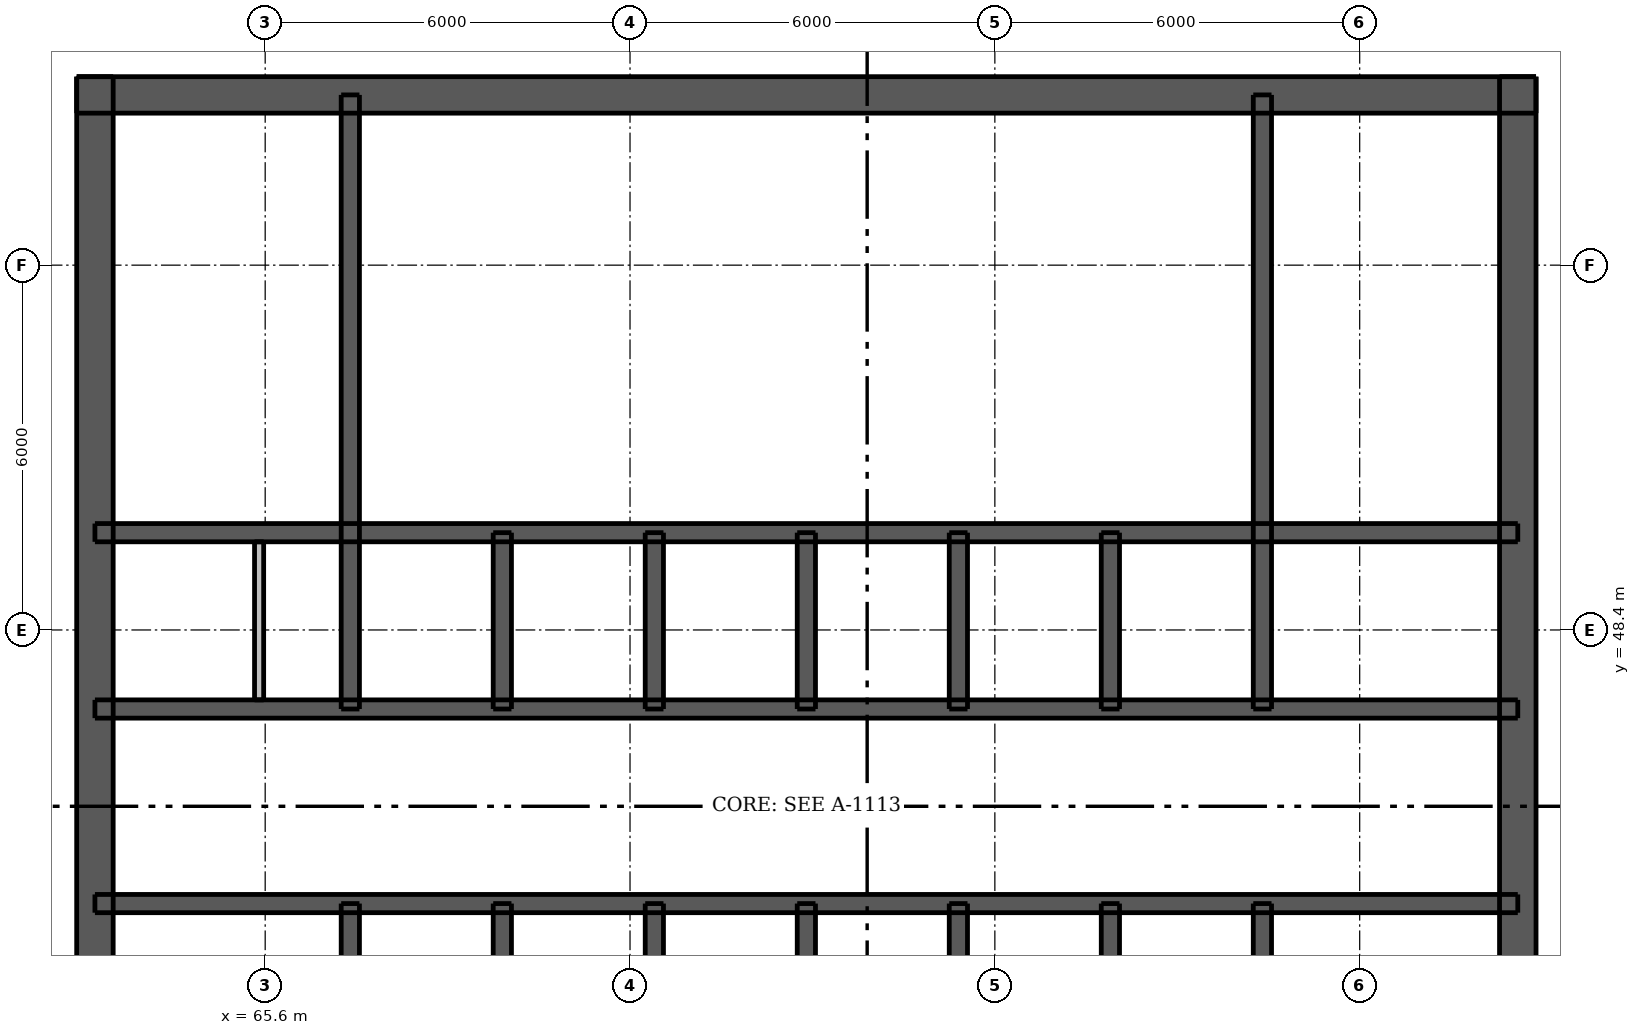
"""IFC4 building model, lengths in metres.
Left out: names, types, materials, properties, quantities, classifications, styles, units other than length and angle.
Written with IfcOpenShell. Run it as: python <this file> out.ifc"""

import sys

from ifc_helpers import new_model, si_unit, direction, frame, frame_2d, origin, place, context, subcontext, project, spatial, rectangle, extrude, element, fill, save


model = new_model("IFC4")
c1 = context("Model", 3, precision=1e-05, world=origin(), true_north=direction((0.0, 1.0)))
c2 = subcontext(c1, "Body", "Model", "MODEL_VIEW")
j1 = project(units=[si_unit("LENGTHUNIT", "METRE"), si_unit("PLANEANGLEUNIT", "RADIAN")], contexts=[c1])
p1 = place(None, origin())
s1 = spatial("IfcSite", under=j1, at=p1, CompositionType="ELEMENT")
p2 = place(p1, origin())
s2 = spatial("IfcBuilding", under=s1, at=p2, CompositionType="ELEMENT")
p3 = place(p2, frame((0.0, 0.0, 226.6)))
s3 = spatial("IfcBuildingStorey", under=s2, at=p3, CompositionType="ELEMENT", Elevation=226.6)
p4 = place(p3, frame((62.5, 57.2, 0.0), z_axis=(0.0, 0.0, 1.0), x_axis=(1.0, 0.0, 0.0)))
e1 = element("IfcWall", 1, at=p4, inside=s3, PredefinedType="SHEAR", context=c2, shape_type="SweptSolid", body=[
    extrude(rectangle(XDim=24.0, YDim=0.6, at=frame_2d((12.0, 0.0))), origin(), (0.0, 0.0, 1.0), 2.95),
])
p5 = place(p4, frame((20.975, 0.0, 0.0)))
e2 = element("IfcOpeningElement", 2, at=p5, cuts=e1, PredefinedType="OPENING", context=c2, shape_type="SweptSolid", body=[
    extrude(rectangle(XDim=1.1, YDim=2.1, at=frame_2d((0.55, 1.05))), frame((0.0, 0.31, 0.0), z_axis=(0.0, -1.0, 0.0), x_axis=(1.0, 0.0, 0.0)), (0.0, 0.0, 1.0), 0.62),
])
p6 = place(p4, frame((1.925, 0.0, 0.0)))
e3 = element("IfcOpeningElement", 3, at=p6, cuts=e1, PredefinedType="OPENING", context=c2, shape_type="SweptSolid", body=[
    extrude(rectangle(XDim=1.1, YDim=2.1, at=frame_2d((0.55, 1.05))), frame((0.0, 0.31, 0.0), z_axis=(0.0, -1.0, 0.0), x_axis=(1.0, 0.0, 0.0)), (0.0, 0.0, 1.0), 0.62),
])
p7 = place(p4, frame((11.55, 0.0, 0.0)))
e4 = element("IfcOpeningElement", 4, at=p7, cuts=e1, PredefinedType="OPENING", context=c2, shape_type="SweptSolid", body=[
    extrude(rectangle(XDim=0.9, YDim=2.1, at=frame_2d((0.45, 1.05))), frame((0.0, 0.31, 0.0), z_axis=(0.0, -1.0, 0.0), x_axis=(1.0, 0.0, 0.0)), (0.0, 0.0, 1.0), 0.62),
])
p8 = place(p3, frame((62.8, 33.5, 0.0), z_axis=(0.0, 0.0, 1.0), x_axis=(0.0, 1.0, 0.0)))
e5 = element("IfcWall", 5, at=p8, inside=s3, PredefinedType="SHEAR", context=c2, shape_type="SweptSolid", body=[
    extrude(rectangle(XDim=24.0, YDim=0.6, at=frame_2d((12.0, 0.0))), origin(), (0.0, 0.0, 1.0), 2.95),
])
p9 = place(p8, frame((11.2, 0.0, 0.0)))
e6 = element("IfcOpeningElement", 6, at=p9, cuts=e5, PredefinedType="OPENING", context=c2, shape_type="SweptSolid", body=[
    extrude(rectangle(XDim=1.6, YDim=2.1, at=frame_2d((0.8, 1.05))), frame((0.0, 0.31, 0.0), z_axis=(0.0, -1.0, 0.0), x_axis=(1.0, 0.0, 0.0)), (0.0, 0.0, 1.0), 0.62),
])
p10 = place(p3, frame((86.2, 33.5, 0.0), z_axis=(0.0, 0.0, 1.0), x_axis=(0.0, 1.0, 0.0)))
e7 = element("IfcWall", 7, at=p10, inside=s3, PredefinedType="SHEAR", context=c2, shape_type="SweptSolid", body=[
    extrude(rectangle(XDim=24.0, YDim=0.6, at=frame_2d((12.0, 0.0))), origin(), (0.0, 0.0, 1.0), 2.95),
])
p11 = place(p10, frame((11.2, 0.0, 0.0)))
e8 = element("IfcOpeningElement", 8, at=p11, cuts=e7, PredefinedType="OPENING", context=c2, shape_type="SweptSolid", body=[
    extrude(rectangle(XDim=1.6, YDim=2.1, at=frame_2d((0.8, 1.05))), frame((0.0, 0.31, 0.0), z_axis=(0.0, -1.0, 0.0), x_axis=(1.0, 0.0, 0.0)), (0.0, 0.0, 1.0), 0.62),
])
p12 = place(p3, frame((62.8, 43.9, 0.0), z_axis=(0.0, 0.0, 1.0), x_axis=(1.0, 0.0, 0.0)))
e9 = element("IfcWall", 9, at=p12, inside=s3, PredefinedType="SHEAR", context=c2, shape_type="SweptSolid", body=[
    extrude(rectangle(XDim=23.4, YDim=0.3, at=frame_2d((11.7, 0.0))), origin(), (0.0, 0.0, 1.0), 2.95),
])
p13 = place(p12, frame((1.725, 0.0, 0.0)))
e10 = element("IfcOpeningElement", 10, at=p13, cuts=e9, PredefinedType="OPENING", context=c2, shape_type="SweptSolid", body=[
    extrude(rectangle(XDim=0.9, YDim=2.1, at=frame_2d((0.45, 1.05))), frame((0.0, 0.16, 0.0), z_axis=(0.0, -1.0, 0.0), x_axis=(1.0, 0.0, 0.0)), (0.0, 0.0, 1.0), 0.32),
])
p14 = place(p12, frame((20.775, 0.0, 0.0)))
e11 = element("IfcOpeningElement", 11, at=p14, cuts=e9, PredefinedType="OPENING", context=c2, shape_type="SweptSolid", body=[
    extrude(rectangle(XDim=0.9, YDim=2.1, at=frame_2d((0.45, 1.05))), frame((0.0, 0.16, 0.0), z_axis=(0.0, -1.0, 0.0), x_axis=(1.0, 0.0, 0.0)), (0.0, 0.0, 1.0), 0.32),
])
p15 = place(p12, frame((5.0, 0.0, 0.0)))
e12 = element("IfcOpeningElement", 12, at=p15, cuts=e9, PredefinedType="OPENING", context=c2, shape_type="SweptSolid", body=[
    extrude(rectangle(XDim=0.9, YDim=2.1, at=frame_2d((0.45, 1.05))), frame((0.0, 0.16, 0.0), z_axis=(0.0, -1.0, 0.0), x_axis=(1.0, 0.0, 0.0)), (0.0, 0.0, 1.0), 0.32),
])
p16 = place(p12, frame((7.5, 0.0, 0.0)))
e13 = element("IfcOpeningElement", 13, at=p16, cuts=e9, PredefinedType="OPENING", context=c2, shape_type="SweptSolid", body=[
    extrude(rectangle(XDim=0.9, YDim=2.1, at=frame_2d((0.45, 1.05))), frame((0.0, 0.16, 0.0), z_axis=(0.0, -1.0, 0.0), x_axis=(1.0, 0.0, 0.0)), (0.0, 0.0, 1.0), 0.32),
])
p17 = place(p12, frame((12.5, 0.0, 0.0)))
e14 = element("IfcOpeningElement", 14, at=p17, cuts=e9, PredefinedType="OPENING", context=c2, shape_type="SweptSolid", body=[
    extrude(rectangle(XDim=0.9, YDim=2.1, at=frame_2d((0.45, 1.05))), frame((0.0, 0.16, 0.0), z_axis=(0.0, -1.0, 0.0), x_axis=(1.0, 0.0, 0.0)), (0.0, 0.0, 1.0), 0.32),
])
p18 = place(p12, frame((15.0, 0.0, 0.0)))
e15 = element("IfcOpeningElement", 15, at=p18, cuts=e9, PredefinedType="OPENING", context=c2, shape_type="SweptSolid", body=[
    extrude(rectangle(XDim=0.9, YDim=2.1, at=frame_2d((0.45, 1.05))), frame((0.0, 0.16, 0.0), z_axis=(0.0, -1.0, 0.0), x_axis=(1.0, 0.0, 0.0)), (0.0, 0.0, 1.0), 0.32),
])
p19 = place(p3, frame((62.8, 47.1, 0.0), z_axis=(0.0, 0.0, 1.0), x_axis=(1.0, 0.0, 0.0)))
e16 = element("IfcWall", 16, at=p19, inside=s3, PredefinedType="SHEAR", context=c2, shape_type="SweptSolid", body=[
    extrude(rectangle(XDim=23.4, YDim=0.3, at=frame_2d((11.7, 0.0))), origin(), (0.0, 0.0, 1.0), 2.95),
])
p20 = place(p19, frame((1.05, 0.0, 0.0)))
e17 = element("IfcOpeningElement", 17, at=p20, cuts=e16, PredefinedType="OPENING", context=c2, shape_type="SweptSolid", body=[
    extrude(rectangle(XDim=0.9, YDim=2.1, at=frame_2d((0.45, 1.05))), frame((0.0, 0.16, 0.0), z_axis=(0.0, -1.0, 0.0), x_axis=(1.0, 0.0, 0.0)), (0.0, 0.0, 1.0), 0.32),
])
p21 = place(p19, frame((2.975, 0.0, 0.0)))
e18 = element("IfcOpeningElement", 18, at=p21, cuts=e16, PredefinedType="OPENING", context=c2, shape_type="SweptSolid", body=[
    extrude(rectangle(XDim=0.8, YDim=2.1, at=frame_2d((0.4, 1.05))), frame((0.0, 0.16, 0.0), z_axis=(0.0, -1.0, 0.0), x_axis=(1.0, 0.0, 0.0)), (0.0, 0.0, 1.0), 0.32),
])
p22 = place(p19, frame((20.775, 0.0, 0.0)))
e19 = element("IfcOpeningElement", 19, at=p22, cuts=e16, PredefinedType="OPENING", context=c2, shape_type="SweptSolid", body=[
    extrude(rectangle(XDim=0.9, YDim=2.1, at=frame_2d((0.45, 1.05))), frame((0.0, 0.16, 0.0), z_axis=(0.0, -1.0, 0.0), x_axis=(1.0, 0.0, 0.0)), (0.0, 0.0, 1.0), 0.32),
])
p23 = place(p19, frame((4.9, 0.0, 0.0)))
e20 = element("IfcOpeningElement", 20, at=p23, cuts=e16, PredefinedType="OPENING", context=c2, shape_type="SweptSolid", body=[
    extrude(rectangle(XDim=1.1, YDim=2.1, at=frame_2d((0.55, 1.05))), frame((0.0, 0.16, 0.0), z_axis=(0.0, -1.0, 0.0), x_axis=(1.0, 0.0, 0.0)), (0.0, 0.0, 1.0), 0.32),
])
p24 = place(p19, frame((7.4, 0.0, 0.0)))
e21 = element("IfcOpeningElement", 21, at=p24, cuts=e16, PredefinedType="OPENING", context=c2, shape_type="SweptSolid", body=[
    extrude(rectangle(XDim=1.1, YDim=2.1, at=frame_2d((0.55, 1.05))), frame((0.0, 0.16, 0.0), z_axis=(0.0, -1.0, 0.0), x_axis=(1.0, 0.0, 0.0)), (0.0, 0.0, 1.0), 0.32),
])
p25 = place(p19, frame((9.9, 0.0, 0.0)))
e22 = element("IfcOpeningElement", 22, at=p25, cuts=e16, PredefinedType="OPENING", context=c2, shape_type="SweptSolid", body=[
    extrude(rectangle(XDim=1.1, YDim=2.1, at=frame_2d((0.55, 1.05))), frame((0.0, 0.16, 0.0), z_axis=(0.0, -1.0, 0.0), x_axis=(1.0, 0.0, 0.0)), (0.0, 0.0, 1.0), 0.32),
])
p26 = place(p19, frame((12.4, 0.0, 0.0)))
e23 = element("IfcOpeningElement", 23, at=p26, cuts=e16, PredefinedType="OPENING", context=c2, shape_type="SweptSolid", body=[
    extrude(rectangle(XDim=1.1, YDim=2.1, at=frame_2d((0.55, 1.05))), frame((0.0, 0.16, 0.0), z_axis=(0.0, -1.0, 0.0), x_axis=(1.0, 0.0, 0.0)), (0.0, 0.0, 1.0), 0.32),
])
p27 = place(p19, frame((14.9, 0.0, 0.0)))
e24 = element("IfcOpeningElement", 24, at=p27, cuts=e16, PredefinedType="OPENING", context=c2, shape_type="SweptSolid", body=[
    extrude(rectangle(XDim=1.1, YDim=2.1, at=frame_2d((0.55, 1.05))), frame((0.0, 0.16, 0.0), z_axis=(0.0, -1.0, 0.0), x_axis=(1.0, 0.0, 0.0)), (0.0, 0.0, 1.0), 0.32),
])
p28 = place(p19, frame((17.4, 0.0, 0.0)))
e25 = element("IfcOpeningElement", 25, at=p28, cuts=e16, PredefinedType="OPENING", context=c2, shape_type="SweptSolid", body=[
    extrude(rectangle(XDim=1.1, YDim=2.1, at=frame_2d((0.55, 1.05))), frame((0.0, 0.16, 0.0), z_axis=(0.0, -1.0, 0.0), x_axis=(1.0, 0.0, 0.0)), (0.0, 0.0, 1.0), 0.32),
])
p29 = place(p3, frame((62.8, 50.0, 0.0), z_axis=(0.0, 0.0, 1.0), x_axis=(1.0, 0.0, 0.0)))
e26 = element("IfcWall", 26, at=p29, inside=s3, PredefinedType="SHEAR", context=c2, shape_type="SweptSolid", body=[
    extrude(rectangle(XDim=23.4, YDim=0.3, at=frame_2d((11.7, 0.0))), origin(), (0.0, 0.0, 1.0), 2.95),
])
p30 = place(p3, frame((67.0, 33.8, 0.0), z_axis=(0.0, 0.0, 1.0), x_axis=(0.0, 1.0, 0.0)))
e27 = element("IfcWall", 27, at=p30, inside=s3, PredefinedType="SHEAR", context=c2, shape_type="SweptSolid", body=[
    extrude(rectangle(XDim=10.1, YDim=0.3, at=frame_2d((5.05, 0.0))), origin(), (0.0, 0.0, 1.0), 2.95),
])
p31 = place(p30, frame((0.5, 0.0, 0.0)))
e28 = element("IfcOpeningElement", 28, at=p31, cuts=e27, PredefinedType="OPENING", context=c2, shape_type="SweptSolid", body=[
    extrude(rectangle(XDim=1.1, YDim=2.1, at=frame_2d((0.55, 1.05))), frame((0.0, 0.16, 0.0), z_axis=(0.0, -1.0, 0.0), x_axis=(1.0, 0.0, 0.0)), (0.0, 0.0, 1.0), 0.32),
])
for number, where, z_axis, x_axis in (
    (29, (67.0, 47.1, 0.0), (0.0, 0.0, 1.0), (0.0, 1.0, 0.0)),
    (30, (82.0, 33.8, 0.0), (0.0, 0.0, 1.0), (0.0, 1.0, 0.0)),
    (31, (82.0, 47.1, 0.0), (0.0, 0.0, 1.0), (0.0, 1.0, 0.0)),
):
    element("IfcWall", number, at=place(p3, frame(where, z_axis=z_axis, x_axis=x_axis)), inside=s3, PredefinedType="SHEAR", context=c2, shape_type="SweptSolid", body=[
        extrude(rectangle(XDim=10.1, YDim=0.3, at=frame_2d((5.05, 0.0))), origin(), (0.0, 0.0, 1.0), 2.95),
    ])
for number, where, z_axis, x_axis in (
    (32, (69.5, 41.0, 0.0), (0.0, 0.0, 1.0), (0.0, 1.0, 0.0)),
    (33, (69.5, 47.1, 0.0), (0.0, 0.0, 1.0), (0.0, 1.0, 0.0)),
    (34, (72.0, 41.0, 0.0), (0.0, 0.0, 1.0), (0.0, 1.0, 0.0)),
    (35, (72.0, 47.1, 0.0), (0.0, 0.0, 1.0), (0.0, 1.0, 0.0)),
    (36, (74.5, 41.0, 0.0), (0.0, 0.0, 1.0), (0.0, 1.0, 0.0)),
    (37, (74.5, 47.1, 0.0), (0.0, 0.0, 1.0), (0.0, 1.0, 0.0)),
    (38, (77.0, 41.0, 0.0), (0.0, 0.0, 1.0), (0.0, 1.0, 0.0)),
    (39, (77.0, 47.1, 0.0), (0.0, 0.0, 1.0), (0.0, 1.0, 0.0)),
    (40, (79.5, 41.0, 0.0), (0.0, 0.0, 1.0), (0.0, 1.0, 0.0)),
    (41, (79.5, 47.1, 0.0), (0.0, 0.0, 1.0), (0.0, 1.0, 0.0)),
):
    element("IfcWall", number, at=place(p3, frame(where, z_axis=z_axis, x_axis=x_axis)), inside=s3, PredefinedType="SHEAR", context=c2, shape_type="SweptSolid", body=[
        extrude(rectangle(XDim=2.9, YDim=0.3, at=frame_2d((1.45, 0.0))), origin(), (0.0, 0.0, 1.0), 2.95),
    ])
p32 = place(p3, frame((65.5, 47.25, 0.0), z_axis=(0.0, 0.0, 1.0), x_axis=(0.0, 1.0, 0.0)))
e42 = element("IfcWall", 42, at=p32, inside=s3, PredefinedType="PLUMBINGWALL", context=c2, shape_type="SweptSolid", body=[
    extrude(rectangle(XDim=2.6, YDim=0.15, at=frame_2d((1.3, 0.0))), origin(), (0.0, 0.0, 1.0), 2.95),
])
p33 = place(p5, origin())
e43 = element("IfcDoor", 43, at=p33, inside=s3, OperationType="SINGLE_SWING_RIGHT", PredefinedType="DOOR", context=c2, shape_type="SweptSolid", body=[
    extrude(rectangle(XDim=1.1, YDim=2.1, at=frame_2d((0.55, 1.05))), frame((0.0, -0.237, 0.0), z_axis=(0.0, -1.0, 0.0), x_axis=(1.0, 0.0, 0.0)), (0.0, 0.0, 1.0), 0.05),
])
fill(e2, e43)
p34 = place(p6, origin())
e44 = element("IfcDoor", 44, at=p34, inside=s3, OperationType="SINGLE_SWING_LEFT", PredefinedType="DOOR", context=c2, shape_type="SweptSolid", body=[
    extrude(rectangle(XDim=1.1, YDim=2.1, at=frame_2d((0.55, 1.05))), frame((0.0, -0.237, 0.0), z_axis=(0.0, -1.0, 0.0), x_axis=(1.0, 0.0, 0.0)), (0.0, 0.0, 1.0), 0.05),
])
fill(e3, e44)
p35 = place(p9, origin())
e45 = element("IfcDoor", 45, at=p35, inside=s3, OperationType="DOUBLE_DOOR_SINGLE_SWING", PredefinedType="DOOR", context=c2, shape_type="SweptSolid", body=[
    extrude(rectangle(XDim=1.6, YDim=2.1, at=frame_2d((0.8, 1.05))), frame((0.0, -0.237, 0.0), z_axis=(0.0, -1.0, 0.0), x_axis=(1.0, 0.0, 0.0)), (0.0, 0.0, 1.0), 0.05),
])
fill(e6, e45)
p36 = place(p11, origin())
e46 = element("IfcDoor", 46, at=p36, inside=s3, OperationType="DOUBLE_DOOR_SINGLE_SWING", PredefinedType="DOOR", context=c2, shape_type="SweptSolid", body=[
    extrude(rectangle(XDim=1.6, YDim=2.1, at=frame_2d((0.8, 1.05))), frame((0.0, 0.288, 0.0), z_axis=(0.0, -1.0, 0.0), x_axis=(1.0, 0.0, 0.0)), (0.0, 0.0, 1.0), 0.05),
])
fill(e8, e46)
p37 = place(p13, origin())
e47 = element("IfcDoor", 47, at=p37, inside=s3, OperationType="SINGLE_SWING_LEFT", PredefinedType="DOOR", context=c2, shape_type="SweptSolid", body=[
    extrude(rectangle(XDim=0.9, YDim=2.1, at=frame_2d((0.45, 1.05))), frame((0.0, -0.087, 0.0), z_axis=(0.0, -1.0, 0.0), x_axis=(1.0, 0.0, 0.0)), (0.0, 0.0, 1.0), 0.05),
])
fill(e10, e47)
p38 = place(p14, origin())
e48 = element("IfcDoor", 48, at=p38, inside=s3, OperationType="SINGLE_SWING_LEFT", PredefinedType="DOOR", context=c2, shape_type="SweptSolid", body=[
    extrude(rectangle(XDim=0.9, YDim=2.1, at=frame_2d((0.45, 1.05))), frame((0.0, -0.087, 0.0), z_axis=(0.0, -1.0, 0.0), x_axis=(1.0, 0.0, 0.0)), (0.0, 0.0, 1.0), 0.05),
])
fill(e11, e48)
p39 = place(p20, origin())
e49 = element("IfcDoor", 49, at=p39, inside=s3, OperationType="SINGLE_SWING_LEFT", PredefinedType="DOOR", context=c2, shape_type="SweptSolid", body=[
    extrude(rectangle(XDim=0.9, YDim=2.1, at=frame_2d((0.45, 1.05))), frame((0.0, 0.138, 0.0), z_axis=(0.0, -1.0, 0.0), x_axis=(1.0, 0.0, 0.0)), (0.0, 0.0, 1.0), 0.05),
])
fill(e17, e49)
p40 = place(p21, origin())
e50 = element("IfcDoor", 50, at=p40, inside=s3, OperationType="SINGLE_SWING_RIGHT", PredefinedType="DOOR", context=c2, shape_type="SweptSolid", body=[
    extrude(rectangle(XDim=0.8, YDim=2.1, at=frame_2d((0.4, 1.05))), frame((0.0, 0.138, 0.0), z_axis=(0.0, -1.0, 0.0), x_axis=(1.0, 0.0, 0.0)), (0.0, 0.0, 1.0), 0.05),
])
fill(e18, e50)
p41 = place(p22, origin())
e51 = element("IfcDoor", 51, at=p41, inside=s3, OperationType="SINGLE_SWING_LEFT", PredefinedType="DOOR", context=c2, shape_type="SweptSolid", body=[
    extrude(rectangle(XDim=0.9, YDim=2.1, at=frame_2d((0.45, 1.05))), frame((0.0, 0.138, 0.0), z_axis=(0.0, -1.0, 0.0), x_axis=(1.0, 0.0, 0.0)), (0.0, 0.0, 1.0), 0.05),
])
fill(e19, e51)
p42 = place(p7, origin())
e52 = element("IfcDoor", 52, at=p42, inside=s3, OperationType="SINGLE_SWING_RIGHT", PredefinedType="DOOR", context=c2, shape_type="SweptSolid", body=[
    extrude(rectangle(XDim=0.9, YDim=2.1, at=frame_2d((0.45, 1.05))), frame((0.0, -0.237, 0.0), z_axis=(0.0, -1.0, 0.0), x_axis=(1.0, 0.0, 0.0)), (0.0, 0.0, 1.0), 0.05),
])
fill(e4, e52)
p43 = place(p15, origin())
e53 = element("IfcDoor", 53, at=p43, inside=s3, OperationType="SINGLE_SWING_RIGHT", PredefinedType="DOOR", context=c2, shape_type="SweptSolid", body=[
    extrude(rectangle(XDim=0.9, YDim=2.1, at=frame_2d((0.45, 1.05))), frame((0.0, -0.087, 0.0), z_axis=(0.0, -1.0, 0.0), x_axis=(1.0, 0.0, 0.0)), (0.0, 0.0, 1.0), 0.05),
])
fill(e12, e53)
p44 = place(p16, origin())
e54 = element("IfcDoor", 54, at=p44, inside=s3, OperationType="SINGLE_SWING_LEFT", PredefinedType="DOOR", context=c2, shape_type="SweptSolid", body=[
    extrude(rectangle(XDim=0.9, YDim=2.1, at=frame_2d((0.45, 1.05))), frame((0.0, -0.087, 0.0), z_axis=(0.0, -1.0, 0.0), x_axis=(1.0, 0.0, 0.0)), (0.0, 0.0, 1.0), 0.05),
])
fill(e13, e54)
p45 = place(p17, origin())
e55 = element("IfcDoor", 55, at=p45, inside=s3, OperationType="SINGLE_SWING_LEFT", PredefinedType="DOOR", context=c2, shape_type="SweptSolid", body=[
    extrude(rectangle(XDim=0.9, YDim=2.1, at=frame_2d((0.45, 1.05))), frame((0.0, -0.087, 0.0), z_axis=(0.0, -1.0, 0.0), x_axis=(1.0, 0.0, 0.0)), (0.0, 0.0, 1.0), 0.05),
])
fill(e14, e55)
p46 = place(p18, origin())
e56 = element("IfcDoor", 56, at=p46, inside=s3, OperationType="SINGLE_SWING_RIGHT", PredefinedType="DOOR", context=c2, shape_type="SweptSolid", body=[
    extrude(rectangle(XDim=0.9, YDim=2.1, at=frame_2d((0.45, 1.05))), frame((0.0, -0.087, 0.0), z_axis=(0.0, -1.0, 0.0), x_axis=(1.0, 0.0, 0.0)), (0.0, 0.0, 1.0), 0.05),
])
fill(e15, e56)
p47 = place(p23, origin())
e57 = element("IfcDoor", 57, at=p47, inside=s3, OperationType="DOUBLE_DOOR_SLIDING", PredefinedType="DOOR", context=c2, shape_type="SweptSolid", body=[
    extrude(rectangle(XDim=1.1, YDim=2.1, at=frame_2d((0.55, 1.05))), frame((0.0, 0.025, 0.0), z_axis=(0.0, -1.0, 0.0), x_axis=(1.0, 0.0, 0.0)), (0.0, 0.0, 1.0), 0.05),
])
fill(e20, e57)
p48 = place(p24, origin())
e58 = element("IfcDoor", 58, at=p48, inside=s3, OperationType="DOUBLE_DOOR_SLIDING", PredefinedType="DOOR", context=c2, shape_type="SweptSolid", body=[
    extrude(rectangle(XDim=1.1, YDim=2.1, at=frame_2d((0.55, 1.05))), frame((0.0, 0.025, 0.0), z_axis=(0.0, -1.0, 0.0), x_axis=(1.0, 0.0, 0.0)), (0.0, 0.0, 1.0), 0.05),
])
fill(e21, e58)
p49 = place(p25, origin())
e59 = element("IfcDoor", 59, at=p49, inside=s3, OperationType="DOUBLE_DOOR_SLIDING", PredefinedType="DOOR", context=c2, shape_type="SweptSolid", body=[
    extrude(rectangle(XDim=1.1, YDim=2.1, at=frame_2d((0.55, 1.05))), frame((0.0, 0.025, 0.0), z_axis=(0.0, -1.0, 0.0), x_axis=(1.0, 0.0, 0.0)), (0.0, 0.0, 1.0), 0.05),
])
fill(e22, e59)
p50 = place(p26, origin())
e60 = element("IfcDoor", 60, at=p50, inside=s3, OperationType="DOUBLE_DOOR_SLIDING", PredefinedType="DOOR", context=c2, shape_type="SweptSolid", body=[
    extrude(rectangle(XDim=1.1, YDim=2.1, at=frame_2d((0.55, 1.05))), frame((0.0, 0.025, 0.0), z_axis=(0.0, -1.0, 0.0), x_axis=(1.0, 0.0, 0.0)), (0.0, 0.0, 1.0), 0.05),
])
fill(e23, e60)
p51 = place(p27, origin())
e61 = element("IfcDoor", 61, at=p51, inside=s3, OperationType="DOUBLE_DOOR_SLIDING", PredefinedType="DOOR", context=c2, shape_type="SweptSolid", body=[
    extrude(rectangle(XDim=1.1, YDim=2.1, at=frame_2d((0.55, 1.05))), frame((0.0, 0.025, 0.0), z_axis=(0.0, -1.0, 0.0), x_axis=(1.0, 0.0, 0.0)), (0.0, 0.0, 1.0), 0.05),
])
fill(e24, e61)
p52 = place(p28, origin())
e62 = element("IfcDoor", 62, at=p52, inside=s3, OperationType="DOUBLE_DOOR_SLIDING", PredefinedType="DOOR", context=c2, shape_type="SweptSolid", body=[
    extrude(rectangle(XDim=1.1, YDim=2.1, at=frame_2d((0.55, 1.05))), frame((0.0, 0.025, 0.0), z_axis=(0.0, -1.0, 0.0), x_axis=(1.0, 0.0, 0.0)), (0.0, 0.0, 1.0), 0.05),
])
fill(e25, e62)
save(model, sys.argv[1])
